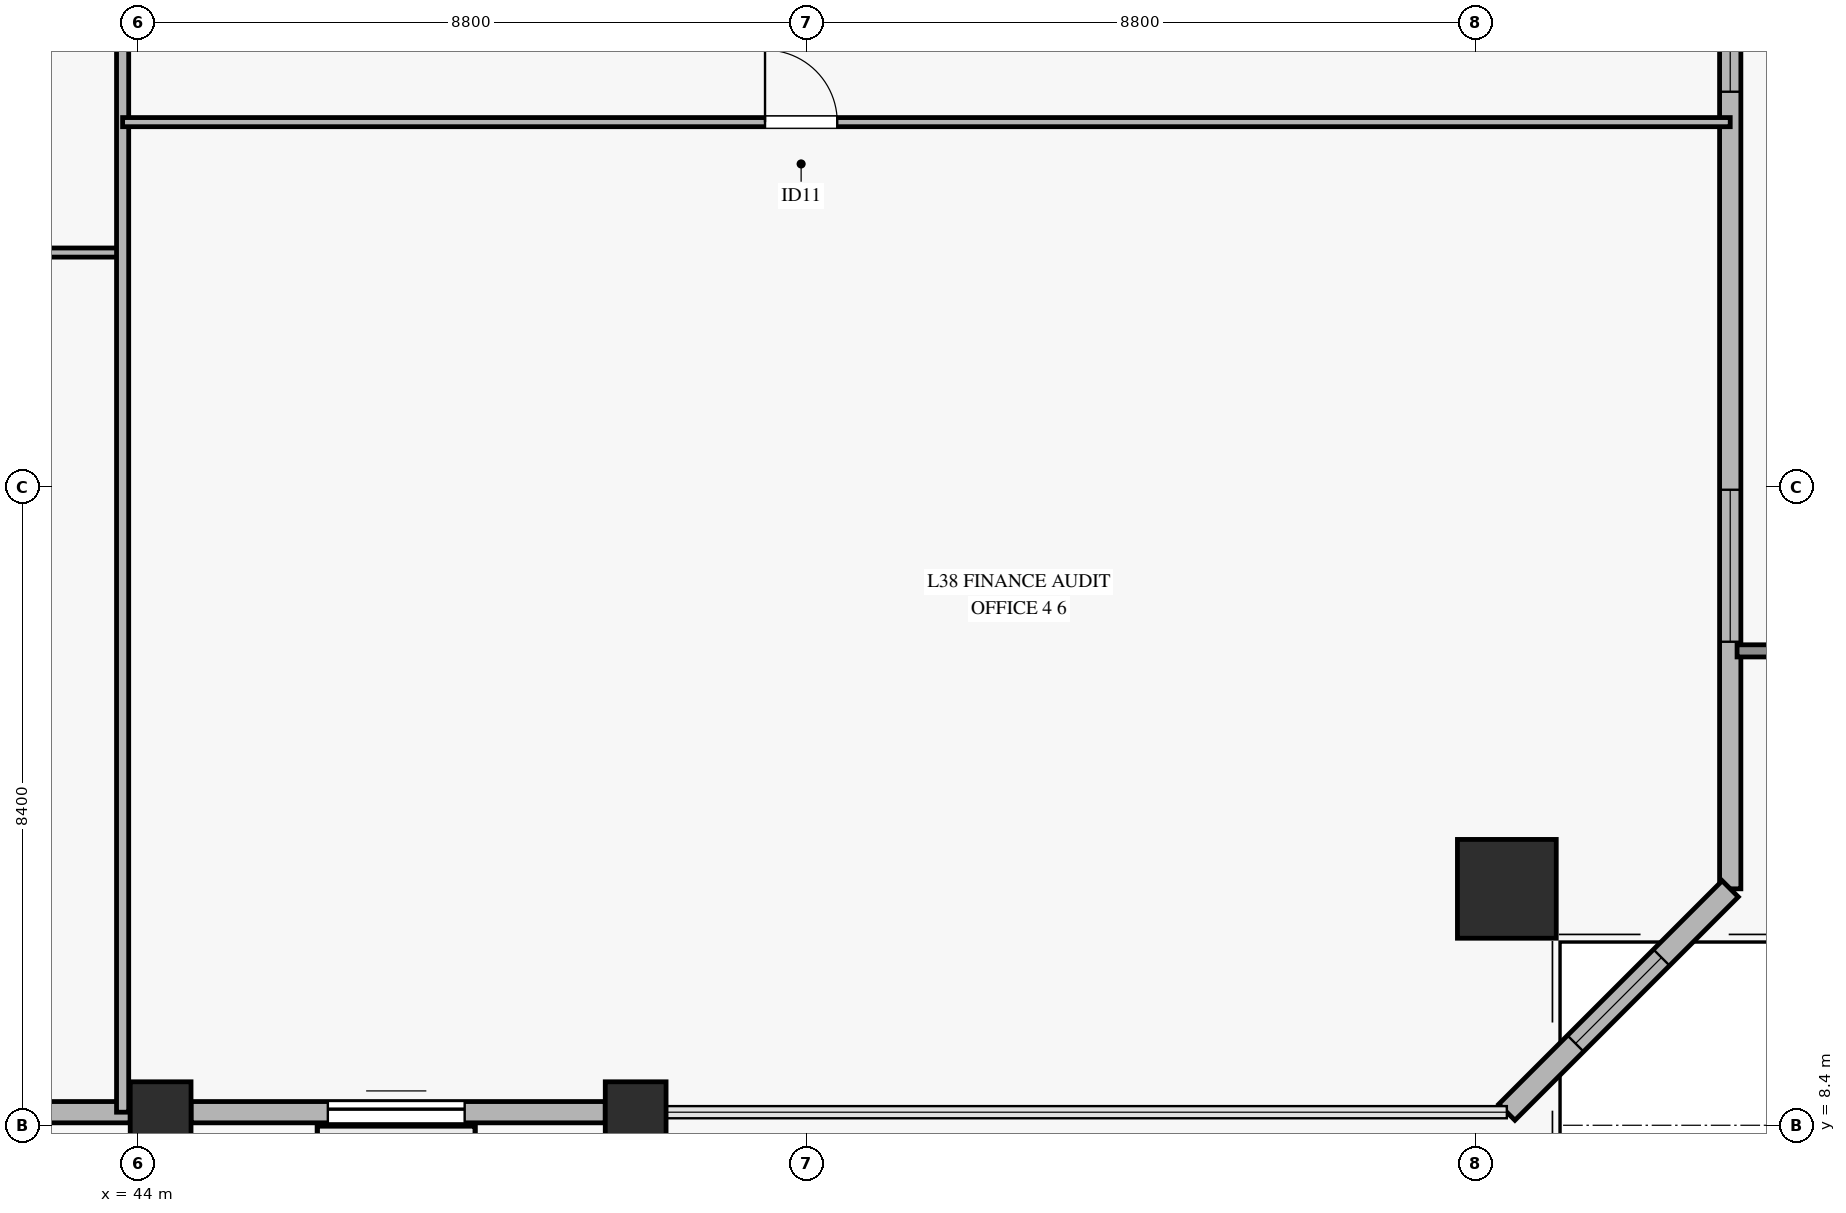
"""IFC4 building model, lengths in metres.
Left out: names, types, materials, properties, quantities, classifications, styles, units other than length and angle.
Written with IfcOpenShell. Run it as: python <this file> out.ifc"""

import sys

from ifc_helpers import new_model, si_unit, direction, frame, frame_2d, origin, origin_2d, place, context, subcontext, project, spatial, rectangle, hollow_rectangle, extrude, source, transform, mapped, element, fill, save


model = new_model("IFC4")
c1 = context("Model", 3, precision=1e-05, world=origin(), true_north=direction((0.0, 1.0)))
c2 = subcontext(c1, "Body", "Model", "MODEL_VIEW")
j1 = project(units=[si_unit("LENGTHUNIT", "METRE"), si_unit("PLANEANGLEUNIT", "RADIAN")], contexts=[c1])
p1 = place(None, origin())
s1 = spatial("IfcSite", under=j1, at=p1, CompositionType="ELEMENT")
p2 = place(p1, origin())
s2 = spatial("IfcBuilding", under=s1, at=p2, CompositionType="ELEMENT")
p3 = place(p2, frame((0.0, 0.0, 156.2)))
s3 = spatial("IfcBuildingStorey", under=s2, at=p3, CompositionType="ELEMENT", Elevation=156.2)
m1 = source(origin(), c2, "Body", "SweptSolid", [
    extrude(hollow_rectangle(XDim=1.3, YDim=1.3, WallThickness=0.06, at=origin_2d()), origin(), (0.0, 0.0, 1.0), 3.315),
])
p4 = place(p3, frame((62.012, 11.511, 0.0), z_axis=(-0.063049281267, 0.150846878546, 0.986544478148), x_axis=(-0.922649834668, -0.385638798084, 0.0)))
e1 = element("IfcColumn", 1, at=p4, inside=s3, PredefinedType="COLUMN", context=c2, shape_type="MappedRepresentation", body=[
    mapped(m1, transform((0.0, 0.0, 0.0), x_axis=(1.0, 0.0, 0.0), y_axis=(0.0, 1.0, 0.0), z_axis=(0.0, 0.0, 1.0), scale=1.0)),
])
m2 = source(origin(), c2, "Body", "SweptSolid", [
    extrude(hollow_rectangle(XDim=0.8, YDim=0.8, WallThickness=0.036, at=origin_2d()), origin(), (0.0, 0.0, 1.0), 3.312),
])
for number, where, z_axis, x_axis in (
    (2, (44.3, 8.572, 0.0), (0.0, 0.159, 0.987), (-1.0, 0.0, 0.0)),
    (3, (50.55, 8.572, 0.0), (0.0, 0.159, 0.987), (-1.0, 0.0, 0.0)),
):
    element("IfcColumn", number, at=place(p3, frame(where, z_axis=z_axis, x_axis=x_axis)), inside=s3, PredefinedType="COLUMN", context=c2, shape_type="MappedRepresentation", body=[
        mapped(m2, transform((0.0, 0.0, 0.0), x_axis=(1.0, 0.0, 0.0), y_axis=(0.0, 1.0, 0.0), z_axis=(0.0, 0.0, 1.0), scale=1.0)),
    ])
p5 = place(p3, frame((37.95, 8.572, 0.0), z_axis=(0.0, 0.0, 1.0), x_axis=(1.0, 0.0, 0.0)))
e4 = element("IfcWall", 4, at=p5, inside=s3, PredefinedType="SOLIDWALL", context=c2, shape_type="SweptSolid", body=[
    extrude(rectangle(XDim=5.95, YDim=0.28, at=frame_2d((2.975, 0.0))), origin(), (0.0, 0.0, 1.0), 2.75),
])
p6 = place(p3, frame((44.7, 8.572, 0.0), z_axis=(0.0, 0.0, 1.0), x_axis=(1.0, 0.0, 0.0)))
e5 = element("IfcWall", 5, at=p6, inside=s3, PredefinedType="SOLIDWALL", context=c2, shape_type="SweptSolid", body=[
    extrude(rectangle(XDim=5.45, YDim=0.28, at=frame_2d((2.725, 0.0))), origin(), (0.0, 0.0, 1.0), 2.75),
])
p7 = place(p6, frame((1.8, 0.0, 0.0)))
e6 = element("IfcOpeningElement", 6, at=p7, cuts=e5, PredefinedType="OPENING", context=c2, shape_type="SweptSolid", body=[
    extrude(rectangle(XDim=1.8, YDim=2.25, at=frame_2d((0.9, 1.125))), frame((0.0, 0.15, 0.0), z_axis=(0.0, -1.0, 0.0), x_axis=(1.0, 0.0, 0.0)), (0.0, 0.0, 1.0), 0.3),
])
p8 = place(p3, frame((64.951, 11.511, 0.0), z_axis=(0.0, 0.0, 1.0), x_axis=(0.0, 1.0, 0.0)))
e7 = element("IfcWall", 7, at=p8, inside=s3, PredefinedType="SOLIDWALL", context=c2, shape_type="SweptSolid", body=[
    extrude(rectangle(XDim=15.425, YDim=0.28, at=frame_2d((7.712, 0.0))), origin(), (0.0, 0.0, 1.0), 2.75),
])
p9 = place(p8, frame((3.251, 0.0, 0.45)))
e8 = element("IfcOpeningElement", 8, at=p9, cuts=e7, PredefinedType="OPENING", context=c2, shape_type="SweptSolid", body=[
    extrude(rectangle(XDim=2.0, YDim=2.0, at=frame_2d((1.0, 1.0))), frame((0.0, 0.15, 0.0), z_axis=(0.0, -1.0, 0.0), x_axis=(1.0, 0.0, 0.0)), (0.0, 0.0, 1.0), 0.3),
])
p10 = place(p8, frame((10.488, 0.0, 0.45)))
e9 = element("IfcOpeningElement", 9, at=p10, cuts=e7, PredefinedType="OPENING", context=c2, shape_type="SweptSolid", body=[
    extrude(rectangle(XDim=2.0, YDim=2.0, at=frame_2d((1.0, 1.0))), frame((0.0, 0.15, 0.0), z_axis=(0.0, -1.0, 0.0), x_axis=(1.0, 0.0, 0.0)), (0.0, 0.0, 1.0), 0.3),
])
p11 = place(p3, frame((62.012, 8.572, 0.0), z_axis=(0.0, 0.0, 1.0), x_axis=(0.707106781187, 0.707106781187, 0.0)))
e10 = element("IfcWall", 10, at=p11, inside=s3, PredefinedType="SOLIDWALL", context=c2, shape_type="SweptSolid", body=[
    extrude(rectangle(XDim=4.156, YDim=0.3, at=frame_2d((2.078, 0.0))), origin(), (0.0, 0.0, 1.0), 2.75),
])
p12 = place(p11, frame((1.278, 0.0, 0.45)))
e11 = element("IfcOpeningElement", 11, at=p12, cuts=e10, PredefinedType="OPENING", context=c2, shape_type="SweptSolid", body=[
    extrude(rectangle(XDim=1.6, YDim=2.0, at=frame_2d((0.8, 1.0))), frame((0.0, 0.16, 0.0), z_axis=(0.0, -1.0, 0.0), x_axis=(1.0, 0.0, 0.0)), (0.0, 0.0, 1.0), 0.32),
])
p13 = place(p3, frame((38.6, 19.883, 0.0), z_axis=(0.0, 0.0, 1.0), x_axis=(1.0, 0.0, 0.0)))
e12 = element("IfcWall", 12, at=p13, inside=s3, PredefinedType="PARTITIONING", context=c2, shape_type="SweptSolid", body=[
    extrude(rectangle(XDim=5.2, YDim=0.12, at=frame_2d((2.6, 0.0))), origin(), (0.0, 0.0, 1.0), 3.27),
])
p14 = place(p13, frame((2.325, 0.0, 0.0)))
e13 = element("IfcOpeningElement", 13, at=p14, cuts=e12, PredefinedType="OPENING", context=c2, shape_type="SweptSolid", body=[
    extrude(rectangle(XDim=0.95, YDim=2.1, at=frame_2d((0.475, 1.05))), frame((0.0, 0.07, 0.0), z_axis=(0.0, -1.0, 0.0), x_axis=(1.0, 0.0, 0.0)), (0.0, 0.0, 1.0), 0.14),
])
p15 = place(p3, frame((43.8, 8.572, 0.0), z_axis=(0.0, 0.0, 1.0), x_axis=(0.0, 1.0, 0.0)))
e14 = element("IfcWall", 14, at=p15, inside=s3, PredefinedType="PARTITIONING", context=c2, shape_type="SweptSolid", body=[
    extrude(rectangle(XDim=25.328, YDim=0.16, at=frame_2d((12.664, 0.0))), origin(), (0.0, 0.0, 1.0), 2.755),
])
p16 = place(p3, frame((43.8, 21.599, 0.0), z_axis=(0.0, 0.0, 1.0), x_axis=(1.0, 0.0, 0.0)))
e15 = element("IfcWall", 15, at=p16, inside=s3, PredefinedType="PARTITIONING", context=c2, shape_type="SweptSolid", body=[
    extrude(rectangle(XDim=21.151, YDim=0.12, at=frame_2d((10.575, 0.0))), origin(), (0.0, 0.0, 1.0), 2.455),
])
p17 = place(p16, frame((8.452, 0.0, 0.0)))
e16 = element("IfcOpeningElement", 16, at=p17, cuts=e15, PredefinedType="OPENING", context=c2, shape_type="SweptSolid", body=[
    extrude(rectangle(XDim=0.95, YDim=2.1, at=frame_2d((0.475, 1.05))), frame((0.0, 0.07, 0.0), z_axis=(0.0, -1.0, 0.0), x_axis=(1.0, 0.0, 0.0)), (0.0, 0.0, 1.0), 0.14),
])
m3 = source(origin(), c2, "Body", "SweptSolid", [
    extrude(rectangle(XDim=1.8, YDim=2.25, at=frame_2d((0.9, 1.125))), frame((0.0, 0.025, 0.0), z_axis=(0.0, -1.0, 0.0), x_axis=(1.0, 0.0, 0.0)), (0.0, 0.0, 1.0), 0.05),
])
p18 = place(p7, origin())
e17 = element("IfcDoor", 17, at=p18, inside=s3, OperationType="SLIDING_TO_LEFT", PredefinedType="DOOR", context=c2, shape_type="MappedRepresentation", body=[
    mapped(m3, transform((0.0, 0.0, 0.0), x_axis=(1.0, 0.0, 0.0), y_axis=(0.0, 1.0, 0.0), z_axis=(0.0, 0.0, 1.0), scale=1.0)),
])
fill(e6, e17)
m4 = source(origin(), c2, "Body", "SweptSolid", [
    extrude(rectangle(XDim=2.0, YDim=2.0, at=frame_2d((1.0, 1.0))), frame((0.0, 0.03, 0.0), z_axis=(0.0, -1.0, 0.0), x_axis=(1.0, 0.0, 0.0)), (0.0, 0.0, 1.0), 0.06),
])
p19 = place(p9, origin())
e18 = element("IfcWindow", 18, at=p19, inside=s3, PartitioningType="SINGLE_PANEL", PredefinedType="WINDOW", context=c2, shape_type="MappedRepresentation", body=[
    mapped(m4, transform((0.0, 0.0, 0.0), x_axis=(1.0, 0.0, 0.0), y_axis=(0.0, 1.0, 0.0), z_axis=(0.0, 0.0, 1.0), scale=1.0)),
])
fill(e8, e18)
p20 = place(p10, origin())
e19 = element("IfcWindow", 19, at=p20, inside=s3, PartitioningType="SINGLE_PANEL", PredefinedType="WINDOW", context=c2, shape_type="MappedRepresentation", body=[
    mapped(m4, transform((0.0, 0.0, 0.0), x_axis=(1.0, 0.0, 0.0), y_axis=(0.0, 1.0, 0.0), z_axis=(0.0, 0.0, 1.0), scale=1.0)),
])
fill(e9, e19)
m5 = source(origin(), c2, "Body", "SweptSolid", [
    extrude(rectangle(XDim=1.6, YDim=2.0, at=frame_2d((0.8, 1.0))), frame((0.0, 0.03, 0.0), z_axis=(0.0, -1.0, 0.0), x_axis=(1.0, 0.0, 0.0)), (0.0, 0.0, 1.0), 0.06),
])
p21 = place(p12, origin())
e20 = element("IfcWindow", 20, at=p21, inside=s3, PartitioningType="SINGLE_PANEL", PredefinedType="WINDOW", context=c2, shape_type="MappedRepresentation", body=[
    mapped(m5, transform((0.0, 0.0, 0.0), x_axis=(1.0, 0.0, 0.0), y_axis=(0.0, 1.0, 0.0), z_axis=(0.0, 0.0, 1.0), scale=1.0)),
])
fill(e11, e20)
m6 = source(origin(), c2, "Body", "SweptSolid", [
    extrude(rectangle(XDim=0.95, YDim=2.1, at=frame_2d((0.475, 1.05))), frame((0.0, 0.025, 0.0), z_axis=(0.0, -1.0, 0.0), x_axis=(1.0, 0.0, 0.0)), (0.0, 0.0, 1.0), 0.05),
])
p22 = place(p17, origin())
e21 = element("IfcDoor", 21, at=p22, inside=s3, OperationType="SINGLE_SWING_LEFT", PredefinedType="DOOR", context=c2, shape_type="MappedRepresentation", body=[
    mapped(m6, transform((0.0, 0.0, 0.0), x_axis=(1.0, 0.0, 0.0), y_axis=(0.0, 1.0, 0.0), z_axis=(0.0, 0.0, 1.0), scale=1.0)),
])
fill(e16, e21)
save(model, sys.argv[1])
